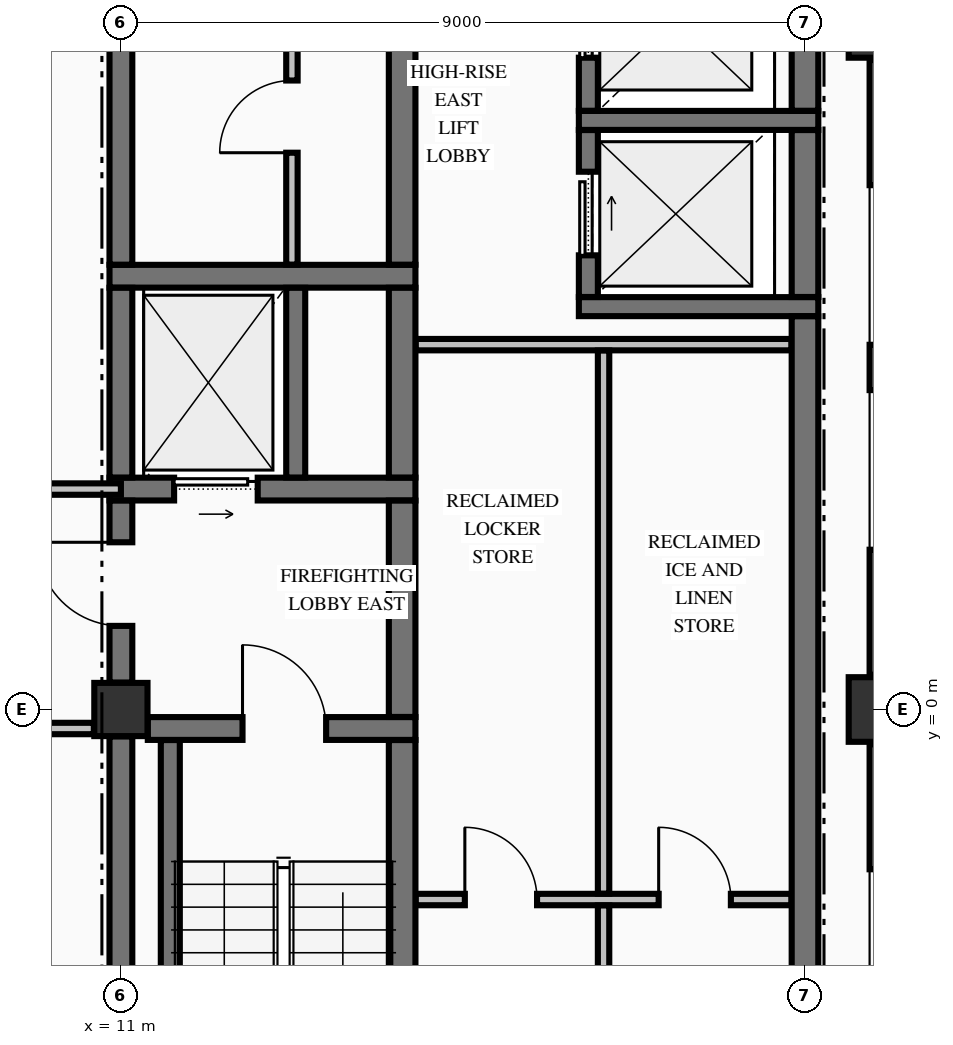
"""IFC4 building model, lengths in metres.
Left out: names, types, materials, properties, quantities, classifications, styles, units other than length and angle.
Written with IfcOpenShell. Run it as: python <this file> out.ifc"""

import sys

from ifc_helpers import new_model, si_unit, direction, frame, frame_2d, origin, origin_2d, place, context, subcontext, project, spatial, rectangle, extrude, element, fill, save


model = new_model("IFC4")
c1 = context("Model", 3, precision=1e-05, world=origin(), true_north=direction((0.0, 1.0)))
c2 = subcontext(c1, "Body", "Model", "MODEL_VIEW")
j1 = project(units=[si_unit("LENGTHUNIT", "METRE"), si_unit("PLANEANGLEUNIT", "RADIAN")], contexts=[c1])
p1 = place(None, origin())
s1 = spatial("IfcSite", under=j1, at=p1, CompositionType="ELEMENT")
p2 = place(p1, origin())
s2 = spatial("IfcBuilding", under=s1, at=p2, CompositionType="ELEMENT")
p3 = place(p2, frame((0.0, 0.0, 257.66)))
s3 = spatial("IfcBuildingStorey", under=s2, at=p3, CompositionType="ELEMENT", Elevation=257.66)
for number, where, z_axis, x_axis in (
    (1, (21.0, 0.0, -0.25), (0.0, 0.0, 1.0), (1.0, 0.0, 0.0)),
    (2, (21.0, 9.0, -0.25), (0.0, 0.0, 1.0), (1.0, 0.0, 0.0)),
):
    element("IfcColumn", number, at=place(p3, frame(where, z_axis=z_axis, x_axis=x_axis)), inside=s3, PredefinedType="COLUMN", context=c2, shape_type="SweptSolid", body=[
        extrude(rectangle(XDim=0.85, YDim=0.85, at=origin_2d()), origin(), (0.0, 0.0, 1.0), 3.23),
    ])
p4 = place(p3, frame((11.0, 0.0, -0.25), z_axis=(0.0, 0.0, 1.0), x_axis=(1.0, 0.0, 0.0)))
e3 = element("IfcColumn", 3, at=p4, inside=s3, PredefinedType="COLUMN", context=c2, shape_type="SweptSolid", body=[
    extrude(rectangle(XDim=0.7, YDim=0.7, at=origin_2d()), origin(), (0.0, 0.0, 1.0), 3.23),
])
p5 = place(p3, frame((21.0, -8.545, 0.0), z_axis=(0.0, 0.0, 1.0), x_axis=(0.0, 1.0, 0.0)))
e4 = element("IfcWall", 4, at=p5, inside=s3, PredefinedType="STANDARD", context=c2, shape_type="SweptSolid", body=[
    extrude(rectangle(XDim=8.09, YDim=0.3, at=frame_2d((4.045, 0.0))), origin(), (0.0, 0.0, 1.0), 2.372),
])
p6 = place(p5, frame((1.647, 0.0, 0.7)))
e5 = element("IfcOpeningElement", 5, at=p6, cuts=e4, PredefinedType="OPENING", context=c2, shape_type="SweptSolid", body=[
    extrude(rectangle(XDim=2.1, YDim=1.5, at=frame_2d((1.05, 0.75))), frame((0.0, 0.16, 0.0), z_axis=(0.0, -1.0, 0.0), x_axis=(1.0, 0.0, 0.0)), (0.0, 0.0, 1.0), 0.32),
])
p7 = place(p5, frame((4.343, 0.0, 0.7)))
e6 = element("IfcOpeningElement", 6, at=p7, cuts=e4, PredefinedType="OPENING", context=c2, shape_type="SweptSolid", body=[
    extrude(rectangle(XDim=2.1, YDim=1.5, at=frame_2d((1.05, 0.75))), frame((0.0, 0.16, 0.0), z_axis=(0.0, -1.0, 0.0), x_axis=(1.0, 0.0, 0.0)), (0.0, 0.0, 1.0), 0.32),
])
p8 = place(p3, frame((21.0, 0.455, 0.0), z_axis=(0.0, 0.0, 1.0), x_axis=(0.0, 1.0, 0.0)))
e7 = element("IfcWall", 7, at=p8, inside=s3, PredefinedType="STANDARD", context=c2, shape_type="SweptSolid", body=[
    extrude(rectangle(XDim=8.09, YDim=0.3, at=frame_2d((4.045, 0.0))), origin(), (0.0, 0.0, 1.0), 2.372),
])
p9 = place(p8, frame((1.647, 0.0, 0.7)))
e8 = element("IfcOpeningElement", 8, at=p9, cuts=e7, PredefinedType="OPENING", context=c2, shape_type="SweptSolid", body=[
    extrude(rectangle(XDim=2.1, YDim=1.5, at=frame_2d((1.05, 0.75))), frame((0.0, 0.16, 0.0), z_axis=(0.0, -1.0, 0.0), x_axis=(1.0, 0.0, 0.0)), (0.0, 0.0, 1.0), 0.32),
])
p10 = place(p8, frame((4.343, 0.0, 0.7)))
e9 = element("IfcOpeningElement", 9, at=p10, cuts=e7, PredefinedType="OPENING", context=c2, shape_type="SweptSolid", body=[
    extrude(rectangle(XDim=2.1, YDim=1.5, at=frame_2d((1.05, 0.75))), frame((0.0, 0.16, 0.0), z_axis=(0.0, -1.0, 0.0), x_axis=(1.0, 0.0, 0.0)), (0.0, 0.0, 1.0), 0.32),
])
p11 = place(p3, frame((11.354, -0.25, 0.0), z_axis=(0.0, 0.0, 1.0), x_axis=(1.0, 0.0, 0.0)))
e10 = element("IfcWall", 10, at=p11, inside=s3, PredefinedType="SHEAR", context=c2, shape_type="SweptSolid", body=[
    extrude(rectangle(XDim=3.521, YDim=0.3, at=frame_2d((1.76, 0.0))), origin(), (0.0, 0.0, 1.0), 2.98),
])
p12 = place(p11, frame((1.246, 0.0, 0.0)))
e11 = element("IfcOpeningElement", 11, at=p12, cuts=e10, PredefinedType="OPENING", context=c2, shape_type="SweptSolid", body=[
    extrude(rectangle(XDim=1.1, YDim=2.15, at=frame_2d((0.55, 1.075))), frame((0.0, 0.16, 0.0), z_axis=(0.0, -1.0, 0.0), x_axis=(1.0, 0.0, 0.0)), (0.0, 0.0, 1.0), 0.32),
])
p13 = place(p3, frame((10.85, 2.9, 0.0), z_axis=(0.0, 0.0, 1.0), x_axis=(1.0, 0.0, 0.0)))
e12 = element("IfcWall", 12, at=p13, inside=s3, PredefinedType="SHEAR", context=c2, shape_type="SweptSolid", body=[
    extrude(rectangle(XDim=4.025, YDim=0.3, at=frame_2d((2.012, 0.0))), origin(), (0.0, 0.0, 1.0), 2.98),
])
p14 = place(p13, frame((0.85, 0.0, 0.0)))
e13 = element("IfcOpeningElement", 13, at=p14, cuts=e12, PredefinedType="OPENING", context=c2, shape_type="SweptSolid", body=[
    extrude(rectangle(XDim=1.1, YDim=2.2, at=frame_2d((0.55, 1.1))), frame((0.0, 0.16, 0.0), z_axis=(0.0, -1.0, 0.0), x_axis=(1.0, 0.0, 0.0)), (0.0, 0.0, 1.0), 0.32),
])
p15 = place(p3, frame((17.025, 5.3, 0.0), z_axis=(0.0, 0.0, 1.0), x_axis=(1.0, 0.0, 0.0)))
e14 = element("IfcWall", 14, at=p15, inside=s3, PredefinedType="SOLIDWALL", context=c2, shape_type="SweptSolid", body=[
    extrude(rectangle(XDim=3.15, YDim=0.25, at=frame_2d((1.575, 0.0))), origin(), (0.0, 0.0, 1.0), 2.98),
])
p16 = place(p3, frame((10.85, 5.7, 0.0), z_axis=(0.0, 0.0, 1.0), x_axis=(1.0, 0.0, 0.0)))
e15 = element("IfcWall", 15, at=p16, inside=s3, PredefinedType="SHEAR", context=c2, shape_type="SweptSolid", body=[
    extrude(rectangle(XDim=4.025, YDim=0.3, at=frame_2d((2.012, 0.0))), origin(), (0.0, 0.0, 1.0), 2.98),
])
p17 = place(p3, frame((17.025, 7.75, 0.0), z_axis=(0.0, 0.0, 1.0), x_axis=(1.0, 0.0, 0.0)))
e16 = element("IfcWall", 16, at=p17, inside=s3, PredefinedType="SOLIDWALL", context=c2, shape_type="SweptSolid", body=[
    extrude(rectangle(XDim=3.15, YDim=0.25, at=frame_2d((1.575, 0.0))), origin(), (0.0, 0.0, 1.0), 2.98),
])
p18 = place(p3, frame((14.878, -2.5, 0.0), z_axis=(0.0, 0.0, 1.0), x_axis=(1.0, 0.0, 0.0)))
e17 = element("IfcWall", 17, at=p18, inside=s3, PredefinedType="PARTITIONING", context=c2, shape_type="SweptSolid", body=[
    extrude(rectangle(XDim=4.944, YDim=0.15, at=frame_2d((2.472, 0.0))), origin(), (0.0, 0.0, 1.0), 2.98),
])
p19 = place(p18, frame((0.647, 0.0, 0.0)))
e18 = element("IfcOpeningElement", 18, at=p19, cuts=e17, PredefinedType="OPENING", context=c2, shape_type="SweptSolid", body=[
    extrude(rectangle(XDim=0.95, YDim=2.15, at=frame_2d((0.475, 1.075))), frame((0.0, 0.085, 0.0), z_axis=(0.0, -1.0, 0.0), x_axis=(1.0, 0.0, 0.0)), (0.0, 0.0, 1.0), 0.17),
])
p20 = place(p18, frame((3.197, 0.0, 0.0)))
e19 = element("IfcOpeningElement", 19, at=p20, cuts=e17, PredefinedType="OPENING", context=c2, shape_type="SweptSolid", body=[
    extrude(rectangle(XDim=0.95, YDim=2.15, at=frame_2d((0.475, 1.075))), frame((0.0, 0.085, 0.0), z_axis=(0.0, -1.0, 0.0), x_axis=(1.0, 0.0, 0.0)), (0.0, 0.0, 1.0), 0.17),
])
p21 = place(p3, frame((-10.644, -0.25, 0.0), z_axis=(0.0, 0.0, 1.0), x_axis=(1.0, 0.0, 0.0)))
e20 = element("IfcWall", 20, at=p21, inside=s3, PredefinedType="PARTITIONING", context=c2, shape_type="SweptSolid", body=[
    extrude(rectangle(XDim=21.288, YDim=0.15, at=frame_2d((10.644, 0.0))), origin(), (0.0, 0.0, 1.0), 2.98),
])
p22 = place(p21, frame((12.744, 0.0, 0.0)))
e21 = element("IfcOpeningElement", 21, at=p22, cuts=e20, PredefinedType="OPENING", context=c2, shape_type="SweptSolid", body=[
    extrude(rectangle(XDim=1.1, YDim=2.15, at=frame_2d((0.55, 1.075))), frame((0.0, 0.085, 0.0), z_axis=(0.0, -1.0, 0.0), x_axis=(1.0, 0.0, 0.0)), (0.0, 0.0, 1.0), 0.17),
])
p23 = place(p21, frame((5.399, 0.0, 0.0)))
e22 = element("IfcOpeningElement", 22, at=p23, cuts=e20, PredefinedType="OPENING", context=c2, shape_type="SweptSolid", body=[
    extrude(rectangle(XDim=1.05, YDim=2.15, at=frame_2d((0.525, 1.075))), frame((0.0, 0.085, 0.0), z_axis=(0.0, -1.0, 0.0), x_axis=(1.0, 0.0, 0.0)), (0.0, 0.0, 1.0), 0.17),
])
p24 = place(p21, frame((17.549, 0.0, 0.0)))
e23 = element("IfcOpeningElement", 23, at=p24, cuts=e20, PredefinedType="OPENING", context=c2, shape_type="SweptSolid", body=[
    extrude(rectangle(XDim=0.95, YDim=2.15, at=frame_2d((0.475, 1.075))), frame((0.0, 0.085, 0.0), z_axis=(0.0, -1.0, 0.0), x_axis=(1.0, 0.0, 0.0)), (0.0, 0.0, 1.0), 0.17),
])
p25 = place(p3, frame((-11.0, 2.9, 0.0), z_axis=(0.0, 0.0, 1.0), x_axis=(1.0, 0.0, 0.0)))
e24 = element("IfcWall", 24, at=p25, inside=s3, PredefinedType="PARTITIONING", context=c2, shape_type="SweptSolid", body=[
    extrude(rectangle(XDim=22.0, YDim=0.15, at=frame_2d((11.0, 0.0))), origin(), (0.0, 0.0, 1.0), 2.98),
])
p26 = place(p25, frame((13.1, 0.0, 0.0)))
e25 = element("IfcOpeningElement", 25, at=p26, cuts=e24, PredefinedType="OPENING", context=c2, shape_type="SweptSolid", body=[
    extrude(rectangle(XDim=1.1, YDim=2.15, at=frame_2d((0.55, 1.075))), frame((0.0, 0.085, 0.0), z_axis=(0.0, -1.0, 0.0), x_axis=(1.0, 0.0, 0.0)), (0.0, 0.0, 1.0), 0.17),
])
p27 = place(p25, frame((5.755, 0.0, 0.0)))
e26 = element("IfcOpeningElement", 26, at=p27, cuts=e24, PredefinedType="OPENING", context=c2, shape_type="SweptSolid", body=[
    extrude(rectangle(XDim=1.05, YDim=2.15, at=frame_2d((0.525, 1.075))), frame((0.0, 0.085, 0.0), z_axis=(0.0, -1.0, 0.0), x_axis=(1.0, 0.0, 0.0)), (0.0, 0.0, 1.0), 0.17),
])
p28 = place(p25, frame((17.83, 0.0, 0.0)))
e27 = element("IfcOpeningElement", 27, at=p28, cuts=e24, PredefinedType="OPENING", context=c2, shape_type="SweptSolid", body=[
    extrude(rectangle(XDim=1.1, YDim=2.15, at=frame_2d((0.55, 1.075))), frame((0.0, 0.085, 0.0), z_axis=(0.0, -1.0, 0.0), x_axis=(1.0, 0.0, 0.0)), (0.0, 0.0, 1.0), 0.17),
])
p29 = place(p3, frame((14.878, 4.8, 0.0), z_axis=(0.0, 0.0, 1.0), x_axis=(1.0, 0.0, 0.0)))
e28 = element("IfcWall", 28, at=p29, inside=s3, PredefinedType="PARTITIONING", context=c2, shape_type="SweptSolid", body=[
    extrude(rectangle(XDim=4.944, YDim=0.15, at=frame_2d((2.472, 0.0))), origin(), (0.0, 0.0, 1.0), 2.98),
])
p30 = place(p3, frame((11.0, -9.596, 0.0), z_axis=(0.0, 0.0, 1.0), x_axis=(0.0, 1.0, 0.0)))
e29 = element("IfcWall", 29, at=p30, inside=s3, PredefinedType="SHEAR", context=c2, shape_type="SweptSolid", body=[
    extrude(rectangle(XDim=9.242, YDim=0.3, at=frame_2d((4.621, 0.0))), origin(), (0.0, 0.0, 1.0), 2.98),
])
p31 = place(p3, frame((11.0, 0.354, 0.0), z_axis=(0.0, 0.0, 1.0), x_axis=(0.0, 1.0, 0.0)))
e30 = element("IfcWall", 30, at=p31, inside=s3, PredefinedType="SHEAR", context=c2, shape_type="SweptSolid", body=[
    extrude(rectangle(XDim=2.394, YDim=0.3, at=frame_2d((1.197, 0.0))), origin(), (0.0, 0.0, 1.0), 2.98),
])
p32 = place(p31, frame((0.746, 0.0, 0.0)))
e31 = element("IfcOpeningElement", 31, at=p32, cuts=e30, PredefinedType="OPENING", context=c2, shape_type="SweptSolid", body=[
    extrude(rectangle(XDim=1.1, YDim=2.15, at=frame_2d((0.55, 1.075))), frame((0.0, 0.16, 0.0), z_axis=(0.0, -1.0, 0.0), x_axis=(1.0, 0.0, 0.0)), (0.0, 0.0, 1.0), 0.32),
])
p33 = place(p3, frame((11.0, 3.052, 0.0), z_axis=(0.0, 0.0, 1.0), x_axis=(0.0, 1.0, 0.0)))
e32 = element("IfcWall", 32, at=p33, inside=s3, PredefinedType="SHEAR", context=c2, shape_type="SweptSolid", body=[
    extrude(rectangle(XDim=2.496, YDim=0.3, at=frame_2d((1.248, 0.0))), origin(), (0.0, 0.0, 1.0), 2.98),
])
p34 = place(p3, frame((11.0, 5.852, 0.0), z_axis=(0.0, 0.0, 1.0), x_axis=(0.0, 1.0, 0.0)))
e33 = element("IfcWall", 33, at=p34, inside=s3, PredefinedType="SHEAR", context=c2, shape_type="SweptSolid", body=[
    extrude(rectangle(XDim=4.294, YDim=0.3, at=frame_2d((2.147, 0.0))), origin(), (0.0, 0.0, 1.0), 2.98),
])
p35 = place(p3, frame((11.65, -9.798, 0.0), z_axis=(0.0, 0.0, 1.0), x_axis=(0.0, 1.0, 0.0)))
e34 = element("IfcWall", 34, at=p35, inside=s3, PredefinedType="SOLIDWALL", context=c2, shape_type="SweptSolid", body=[
    extrude(rectangle(XDim=9.396, YDim=0.25, at=frame_2d((4.698, 0.0))), origin(), (0.0, 0.0, 1.0), 2.98),
])
p36 = place(p3, frame((13.3, 3.052, 0.0), z_axis=(0.0, 0.0, 1.0), x_axis=(0.0, 1.0, 0.0)))
e35 = element("IfcWall", 35, at=p36, inside=s3, PredefinedType="SOLIDWALL", context=c2, shape_type="SweptSolid", body=[
    extrude(rectangle(XDim=2.496, YDim=0.25, at=frame_2d((1.248, 0.0))), origin(), (0.0, 0.0, 1.0), 2.98),
])
p37 = place(p3, frame((14.7, -9.773, 0.0), z_axis=(0.0, 0.0, 1.0), x_axis=(0.0, 1.0, 0.0)))
e36 = element("IfcWall", 36, at=p37, inside=s3, PredefinedType="SHEAR", context=c2, shape_type="SweptSolid", body=[
    extrude(rectangle(XDim=9.371, YDim=0.35, at=frame_2d((4.686, 0.0))), origin(), (0.0, 0.0, 1.0), 2.98),
])
p38 = place(p3, frame((14.7, -0.098, 0.0), z_axis=(0.0, 0.0, 1.0), x_axis=(0.0, 1.0, 0.0)))
e37 = element("IfcWall", 37, at=p38, inside=s3, PredefinedType="SHEAR", context=c2, shape_type="SweptSolid", body=[
    extrude(rectangle(XDim=2.846, YDim=0.35, at=frame_2d((1.423, 0.0))), origin(), (0.0, 0.0, 1.0), 2.98),
])
p39 = place(p3, frame((14.7, 3.052, 0.0), z_axis=(0.0, 0.0, 1.0), x_axis=(0.0, 1.0, 0.0)))
e38 = element("IfcWall", 38, at=p39, inside=s3, PredefinedType="SHEAR", context=c2, shape_type="SweptSolid", body=[
    extrude(rectangle(XDim=2.496, YDim=0.35, at=frame_2d((1.248, 0.0))), origin(), (0.0, 0.0, 1.0), 2.98),
])
p40 = place(p3, frame((14.7, 5.852, 0.0), z_axis=(0.0, 0.0, 1.0), x_axis=(0.0, 1.0, 0.0)))
e39 = element("IfcWall", 39, at=p40, inside=s3, PredefinedType="SHEAR", context=c2, shape_type="SweptSolid", body=[
    extrude(rectangle(XDim=4.471, YDim=0.35, at=frame_2d((2.235, 0.0))), origin(), (0.0, 0.0, 1.0), 2.98),
])
p41 = place(p3, frame((17.15, 5.427, 0.0), z_axis=(0.0, 0.0, 1.0), x_axis=(0.0, 1.0, 0.0)))
e40 = element("IfcWall", 40, at=p41, inside=s3, PredefinedType="SOLIDWALL", context=c2, shape_type="SweptSolid", body=[
    extrude(rectangle(XDim=2.196, YDim=0.25, at=frame_2d((1.098, 0.0))), origin(), (0.0, 0.0, 1.0), 2.98),
])
p42 = place(p41, frame((0.548, 0.0, 0.0)))
e41 = element("IfcOpeningElement", 41, at=p42, cuts=e40, PredefinedType="OPENING", context=c2, shape_type="SweptSolid", body=[
    extrude(rectangle(XDim=1.1, YDim=2.2, at=frame_2d((0.55, 1.1))), frame((0.0, 0.135, 0.0), z_axis=(0.0, -1.0, 0.0), x_axis=(1.0, 0.0, 0.0)), (0.0, 0.0, 1.0), 0.27),
])
p43 = place(p3, frame((17.15, 7.877, 0.0), z_axis=(0.0, 0.0, 1.0), x_axis=(0.0, 1.0, 0.0)))
e42 = element("IfcWall", 42, at=p43, inside=s3, PredefinedType="SOLIDWALL", context=c2, shape_type="SweptSolid", body=[
    extrude(rectangle(XDim=2.446, YDim=0.25, at=frame_2d((1.223, 0.0))), origin(), (0.0, 0.0, 1.0), 2.98),
])
p44 = place(p43, frame((0.698, 0.0, 0.0)))
e43 = element("IfcOpeningElement", 43, at=p44, cuts=e42, PredefinedType="OPENING", context=c2, shape_type="SweptSolid", body=[
    extrude(rectangle(XDim=1.1, YDim=2.2, at=frame_2d((0.55, 1.1))), frame((0.0, 0.135, 0.0), z_axis=(0.0, -1.0, 0.0), x_axis=(1.0, 0.0, 0.0)), (0.0, 0.0, 1.0), 0.27),
])
p45 = place(p3, frame((20.0, -9.596, 0.0), z_axis=(0.0, 0.0, 1.0), x_axis=(0.0, 1.0, 0.0)))
e44 = element("IfcWall", 44, at=p45, inside=s3, PredefinedType="SHEAR", context=c2, shape_type="SweptSolid", body=[
    extrude(rectangle(XDim=14.769, YDim=0.35, at=frame_2d((7.385, 0.0))), origin(), (0.0, 0.0, 1.0), 2.98),
])
p46 = place(p3, frame((20.0, 5.427, 0.0), z_axis=(0.0, 0.0, 1.0), x_axis=(0.0, 1.0, 0.0)))
e45 = element("IfcWall", 45, at=p46, inside=s3, PredefinedType="SHEAR", context=c2, shape_type="SweptSolid", body=[
    extrude(rectangle(XDim=2.196, YDim=0.35, at=frame_2d((1.098, 0.0))), origin(), (0.0, 0.0, 1.0), 2.98),
])
p47 = place(p3, frame((20.0, 7.877, 0.0), z_axis=(0.0, 0.0, 1.0), x_axis=(0.0, 1.0, 0.0)))
e46 = element("IfcWall", 46, at=p47, inside=s3, PredefinedType="SHEAR", context=c2, shape_type="SweptSolid", body=[
    extrude(rectangle(XDim=2.269, YDim=0.35, at=frame_2d((1.135, 0.0))), origin(), (0.0, 0.0, 1.0), 2.98),
])
p48 = place(p3, frame((13.25, 5.853, 0.0), z_axis=(0.0, 0.0, 1.0), x_axis=(0.0, 1.0, 0.0)))
e47 = element("IfcWall", 47, at=p48, inside=s3, PredefinedType="PARTITIONING", context=c2, shape_type="SweptSolid", body=[
    extrude(rectangle(XDim=4.494, YDim=0.15, at=frame_2d((2.247, 0.0))), origin(), (0.0, 0.0, 1.0), 2.98),
])
p49 = place(p48, frame((1.472, 0.0, 0.0)))
e48 = element("IfcOpeningElement", 48, at=p49, cuts=e47, PredefinedType="OPENING", context=c2, shape_type="SweptSolid", body=[
    extrude(rectangle(XDim=0.95, YDim=2.15, at=frame_2d((0.475, 1.075))), frame((0.0, 0.085, 0.0), z_axis=(0.0, -1.0, 0.0), x_axis=(1.0, 0.0, 0.0)), (0.0, 0.0, 1.0), 0.17),
])
p50 = place(p3, frame((17.35, -9.772, 0.0), z_axis=(0.0, 0.0, 1.0), x_axis=(0.0, 1.0, 0.0)))
e49 = element("IfcWall", 49, at=p50, inside=s3, PredefinedType="PARTITIONING", context=c2, shape_type="SweptSolid", body=[
    extrude(rectangle(XDim=7.194, YDim=0.15, at=frame_2d((3.597, 0.0))), origin(), (0.0, 0.0, 1.0), 2.98),
])
p51 = place(p3, frame((17.35, -2.422, 0.0), z_axis=(0.0, 0.0, 1.0), x_axis=(0.0, 1.0, 0.0)))
e50 = element("IfcWall", 50, at=p51, inside=s3, PredefinedType="PARTITIONING", context=c2, shape_type="SweptSolid", body=[
    extrude(rectangle(XDim=7.144, YDim=0.15, at=frame_2d((3.572, 0.0))), origin(), (0.0, 0.0, 1.0), 2.98),
])
p52 = place(p12, origin())
e51 = element("IfcDoor", 51, at=p52, inside=s3, OperationType="SINGLE_SWING_LEFT", PredefinedType="DOOR", context=c2, shape_type="SweptSolid", body=[
    extrude(rectangle(XDim=1.1, YDim=2.15, at=frame_2d((0.55, 1.075))), frame((0.0, 0.025, 0.0), z_axis=(0.0, -1.0, 0.0), x_axis=(1.0, 0.0, 0.0)), (0.0, 0.0, 1.0), 0.05),
])
fill(e11, e51)
p53 = place(p32, origin())
e52 = element("IfcDoor", 52, at=p53, inside=s3, OperationType="SINGLE_SWING_RIGHT", PredefinedType="DOOR", context=c2, shape_type="SweptSolid", body=[
    extrude(rectangle(XDim=1.1, YDim=2.15, at=frame_2d((0.55, 1.075))), frame((0.0, 0.025, 0.0), z_axis=(0.0, -1.0, 0.0), x_axis=(1.0, 0.0, 0.0)), (0.0, 0.0, 1.0), 0.05),
])
fill(e31, e52)
p54 = place(p14, origin())
e53 = element("IfcDoor", 53, at=p54, inside=s3, OperationType="SLIDING_TO_RIGHT", PredefinedType="DOOR", context=c2, shape_type="SweptSolid", body=[
    extrude(rectangle(XDim=1.1, YDim=2.2, at=frame_2d((0.55, 1.1))), frame((0.0, 0.025, 0.0), z_axis=(0.0, -1.0, 0.0), x_axis=(1.0, 0.0, 0.0)), (0.0, 0.0, 1.0), 0.05),
])
fill(e13, e53)
p55 = place(p49, origin())
e54 = element("IfcDoor", 54, at=p55, inside=s3, OperationType="SINGLE_SWING_LEFT", PredefinedType="DOOR", context=c2, shape_type="SweptSolid", body=[
    extrude(rectangle(XDim=0.95, YDim=2.15, at=frame_2d((0.475, 1.075))), frame((0.0, 0.025, 0.0), z_axis=(0.0, -1.0, 0.0), x_axis=(1.0, 0.0, 0.0)), (0.0, 0.0, 1.0), 0.05),
])
fill(e48, e54)
p56 = place(p42, origin())
e55 = element("IfcDoor", 55, at=p56, inside=s3, OperationType="SLIDING_TO_RIGHT", PredefinedType="DOOR", context=c2, shape_type="SweptSolid", body=[
    extrude(rectangle(XDim=1.1, YDim=2.2, at=frame_2d((0.55, 1.1))), frame((0.0, 0.025, 0.0), z_axis=(0.0, -1.0, 0.0), x_axis=(1.0, 0.0, 0.0)), (0.0, 0.0, 1.0), 0.05),
])
fill(e41, e55)
p57 = place(p44, origin())
e56 = element("IfcDoor", 56, at=p57, inside=s3, OperationType="SLIDING_TO_RIGHT", PredefinedType="DOOR", context=c2, shape_type="SweptSolid", body=[
    extrude(rectangle(XDim=1.1, YDim=2.2, at=frame_2d((0.55, 1.1))), frame((0.0, 0.025, 0.0), z_axis=(0.0, -1.0, 0.0), x_axis=(1.0, 0.0, 0.0)), (0.0, 0.0, 1.0), 0.05),
])
fill(e43, e56)
p58 = place(p19, origin())
e57 = element("IfcDoor", 57, at=p58, inside=s3, OperationType="SINGLE_SWING_LEFT", PredefinedType="DOOR", context=c2, shape_type="SweptSolid", body=[
    extrude(rectangle(XDim=0.95, YDim=2.15, at=frame_2d((0.475, 1.075))), frame((0.0, 0.025, 0.0), z_axis=(0.0, -1.0, 0.0), x_axis=(1.0, 0.0, 0.0)), (0.0, 0.0, 1.0), 0.05),
])
fill(e18, e57)
p59 = place(p20, origin())
e58 = element("IfcDoor", 58, at=p59, inside=s3, OperationType="SINGLE_SWING_LEFT", PredefinedType="DOOR", context=c2, shape_type="SweptSolid", body=[
    extrude(rectangle(XDim=0.95, YDim=2.15, at=frame_2d((0.475, 1.075))), frame((0.0, 0.025, 0.0), z_axis=(0.0, -1.0, 0.0), x_axis=(1.0, 0.0, 0.0)), (0.0, 0.0, 1.0), 0.05),
])
fill(e19, e58)
save(model, sys.argv[1])
